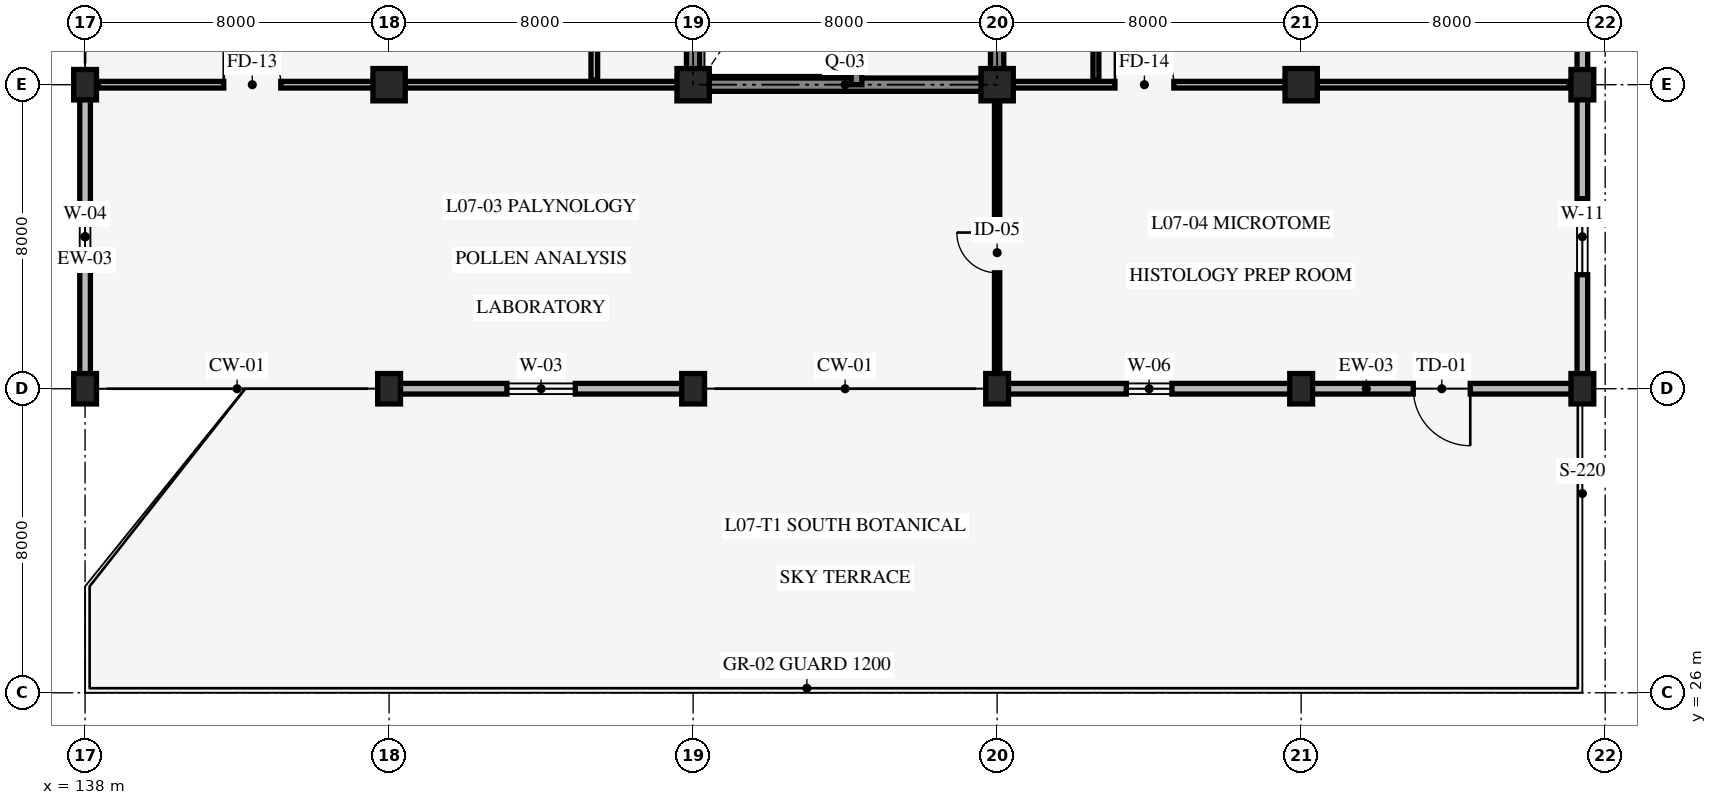
"""IFC4 building model, lengths in metres.
Left out: names, types, materials, properties, quantities, classifications, styles, units other than length and angle.
Written with IfcOpenShell. Run it as: python <this file> out.ifc"""

import sys

from ifc_helpers import new_model, si_unit, direction, frame, frame_2d, origin, origin_2d, place, context, subcontext, project, spatial, rectangle, extrude, element, fill, save


model = new_model("IFC4")
c1 = context("Model", 3, precision=1e-05, world=origin(), true_north=direction((0.0, 1.0)))
c2 = subcontext(c1, "Body", "Model", "MODEL_VIEW")
j1 = project(units=[si_unit("LENGTHUNIT", "METRE"), si_unit("PLANEANGLEUNIT", "RADIAN")], contexts=[c1])
p1 = place(None, origin())
s1 = spatial("IfcSite", under=j1, at=p1, CompositionType="ELEMENT")
p2 = place(p1, origin())
s2 = spatial("IfcBuilding", under=s1, at=p2, CompositionType="ELEMENT")
p3 = place(p2, frame((0.0, 0.0, 27.6)))
s3 = spatial("IfcBuildingStorey", under=s2, at=p3, CompositionType="ELEMENT", Elevation=27.6)
p4 = place(p3, frame((154.0, 42.0, 0.0), z_axis=(0.0, 0.0, 1.0), x_axis=(1.0, 0.0, 0.0)))
e1 = element("IfcWall", 1, at=p4, inside=s3, PredefinedType="SHEAR", context=c2, shape_type="SweptSolid", body=[
    extrude(rectangle(XDim=8.0, YDim=0.35, at=frame_2d((4.0, 0.0))), origin(), (0.0, 0.0, 1.0), 3.95),
])
p5 = place(p3, frame((162.0, 42.0, 0.0), z_axis=(0.0, 0.0, 1.0), x_axis=(0.0, 1.0, 0.0)))
e2 = element("IfcWall", 2, at=p5, inside=s3, PredefinedType="SHEAR", context=c2, shape_type="SweptSolid", body=[
    extrude(rectangle(XDim=8.0, YDim=0.35, at=frame_2d((4.0, 0.0))), origin(), (0.0, 0.0, 1.0), 3.95),
])
p6 = place(p5, frame((3.175, 0.0, 0.0)))
e3 = element("IfcOpeningElement", 3, at=p6, cuts=e2, PredefinedType="OPENING", context=c2, shape_type="SweptSolid", body=[
    extrude(rectangle(XDim=1.05, YDim=2.2, at=frame_2d((0.525, 1.1))), frame((0.0, 0.185, 0.0), z_axis=(0.0, -1.0, 0.0), x_axis=(1.0, 0.0, 0.0)), (0.0, 0.0, 1.0), 0.37),
])
p7 = place(p3, frame((154.0, 50.0, 0.0), z_axis=(0.0, 0.0, 1.0), x_axis=(0.0, -1.0, 0.0)))
e4 = element("IfcWall", 4, at=p7, inside=s3, PredefinedType="SHEAR", context=c2, shape_type="SweptSolid", body=[
    extrude(rectangle(XDim=8.0, YDim=0.35, at=frame_2d((4.0, 0.0))), origin(), (0.0, 0.0, 1.0), 3.95),
])
p8 = place(p3, frame((158.3, 42.0, 0.0), z_axis=(0.0, 0.0, 1.0), x_axis=(0.0, 1.0, 0.0)))
e5 = element("IfcWall", 5, at=p8, inside=s3, PredefinedType="SHEAR", context=c2, shape_type="SweptSolid", body=[
    extrude(rectangle(XDim=8.0, YDim=0.28, at=frame_2d((4.0, 0.0))), origin(), (0.0, 0.0, 1.0), 3.95),
])
for number, where, z_axis, x_axis in (
    (6, (138.0, 34.0, 0.0), (0.0, 0.0, 1.0), (1.0, 0.0, 0.0)),
    (7, (138.0, 42.0, 0.0), (0.0, 0.0, 1.0), (1.0, 0.0, 0.0)),
    (8, (146.0, 34.0, 0.0), (0.0, 0.0, 1.0), (1.0, 0.0, 0.0)),
):
    element("IfcColumn", number, at=place(p3, frame(where, z_axis=z_axis, x_axis=x_axis)), inside=s3, PredefinedType="COLUMN", context=c2, shape_type="SweptSolid", body=[
        extrude(rectangle(XDim=0.6, YDim=0.8, at=origin_2d()), origin(), (0.0, 0.0, 1.0), 4.2),
    ])
p9 = place(p3, frame((146.0, 42.0, 0.0), z_axis=(0.0, 0.0, 1.0), x_axis=(1.0, 0.0, 0.0)))
e9 = element("IfcColumn", 9, at=p9, inside=s3, PredefinedType="COLUMN", context=c2, shape_type="SweptSolid", body=[
    extrude(rectangle(XDim=0.85, YDim=0.85, at=origin_2d()), origin(), (0.0, 0.0, 1.0), 4.2),
])
p10 = place(p3, frame((154.0, 34.0, 0.0), z_axis=(0.0, 0.0, 1.0), x_axis=(1.0, 0.0, 0.0)))
e10 = element("IfcColumn", 10, at=p10, inside=s3, PredefinedType="COLUMN", context=c2, shape_type="SweptSolid", body=[
    extrude(rectangle(XDim=0.6, YDim=0.8, at=origin_2d()), origin(), (0.0, 0.0, 1.0), 4.2),
])
p11 = place(p3, frame((154.0, 42.0, 0.0), z_axis=(0.0, 0.0, 1.0), x_axis=(1.0, 0.0, 0.0)))
e11 = element("IfcColumn", 11, at=p11, inside=s3, PredefinedType="COLUMN", context=c2, shape_type="SweptSolid", body=[
    extrude(rectangle(XDim=0.85, YDim=0.85, at=origin_2d()), origin(), (0.0, 0.0, 1.0), 4.2),
])
p12 = place(p3, frame((162.0, 34.0, 0.0), z_axis=(0.0, 0.0, 1.0), x_axis=(1.0, 0.0, 0.0)))
e12 = element("IfcColumn", 12, at=p12, inside=s3, PredefinedType="COLUMN", context=c2, shape_type="SweptSolid", body=[
    extrude(rectangle(XDim=0.6, YDim=0.8, at=origin_2d()), origin(), (0.0, 0.0, 1.0), 4.2),
])
p13 = place(p3, frame((162.0, 42.0, 0.0), z_axis=(0.0, 0.0, 1.0), x_axis=(1.0, 0.0, 0.0)))
e13 = element("IfcColumn", 13, at=p13, inside=s3, PredefinedType="COLUMN", context=c2, shape_type="SweptSolid", body=[
    extrude(rectangle(XDim=0.85, YDim=0.85, at=origin_2d()), origin(), (0.0, 0.0, 1.0), 4.2),
])
p14 = place(p3, frame((170.0, 34.0, 0.0), z_axis=(0.0, 0.0, 1.0), x_axis=(1.0, 0.0, 0.0)))
e14 = element("IfcColumn", 14, at=p14, inside=s3, PredefinedType="COLUMN", context=c2, shape_type="SweptSolid", body=[
    extrude(rectangle(XDim=0.6, YDim=0.8, at=origin_2d()), origin(), (0.0, 0.0, 1.0), 4.2),
])
p15 = place(p3, frame((170.0, 42.0, 0.0), z_axis=(0.0, 0.0, 1.0), x_axis=(1.0, 0.0, 0.0)))
e15 = element("IfcColumn", 15, at=p15, inside=s3, PredefinedType="COLUMN", context=c2, shape_type="SweptSolid", body=[
    extrude(rectangle(XDim=0.85, YDim=0.85, at=origin_2d()), origin(), (0.0, 0.0, 1.0), 4.2),
])
for number, where, z_axis, x_axis in (
    (16, (177.4, 34.0, 0.0), (0.0, 0.0, 1.0), (1.0, 0.0, 0.0)),
    (17, (177.4, 42.0, 0.0), (0.0, 0.0, 1.0), (1.0, 0.0, 0.0)),
):
    element("IfcColumn", number, at=place(p3, frame(where, z_axis=z_axis, x_axis=x_axis)), inside=s3, PredefinedType="COLUMN", context=c2, shape_type="SweptSolid", body=[
        extrude(rectangle(XDim=0.6, YDim=0.8, at=origin_2d()), origin(), (0.0, 0.0, 1.0), 4.2),
    ])
p16 = place(p3, frame((177.4, 34.0, 0.0), z_axis=(0.0, 0.0, 1.0), x_axis=(-1.0, 0.0, 0.0)))
e18 = element("IfcWall", 18, at=p16, inside=s3, PredefinedType="STANDARD", context=c2, shape_type="SweptSolid", body=[
    extrude(rectangle(XDim=7.4, YDim=0.28, at=frame_2d((3.7, 0.0))), origin(), (0.0, 0.0, 1.0), 3.24),
])
p17 = place(p16, frame((2.95, 0.0, 0.0)))
e19 = element("IfcOpeningElement", 19, at=p17, cuts=e18, PredefinedType="OPENING", context=c2, shape_type="SweptSolid", body=[
    extrude(rectangle(XDim=1.5, YDim=2.25, at=frame_2d((0.75, 1.125))), frame((0.0, 0.15, 0.0), z_axis=(0.0, -1.0, 0.0), x_axis=(1.0, 0.0, 0.0)), (0.0, 0.0, 1.0), 0.3),
])
p18 = place(p3, frame((170.0, 34.0, 0.0), z_axis=(0.0, 0.0, 1.0), x_axis=(-1.0, 0.0, 0.0)))
e20 = element("IfcWall", 20, at=p18, inside=s3, PredefinedType="STANDARD", context=c2, shape_type="SweptSolid", body=[
    extrude(rectangle(XDim=8.0, YDim=0.28, at=frame_2d((4.0, 0.0))), origin(), (0.0, 0.0, 1.0), 3.24),
])
p19 = place(p18, frame((3.4, 0.0, 0.85)))
e21 = element("IfcOpeningElement", 21, at=p19, cuts=e20, PredefinedType="OPENING", context=c2, shape_type="SweptSolid", body=[
    extrude(rectangle(XDim=1.2, YDim=1.2, at=frame_2d((0.6, 0.6))), frame((0.0, 0.15, 0.0), z_axis=(0.0, -1.0, 0.0), x_axis=(1.0, 0.0, 0.0)), (0.0, 0.0, 1.0), 0.3),
])
p20 = place(p3, frame((154.0, 34.0, 0.0), z_axis=(0.0, 0.0, 1.0), x_axis=(-1.0, 0.0, 0.0)))
e22 = element("IfcWall", 22, at=p20, inside=s3, PredefinedType="STANDARD", context=c2, shape_type="SweptSolid", body=[
    extrude(rectangle(XDim=8.0, YDim=0.28, at=frame_2d((4.0, 0.0))), origin(), (0.0, 0.0, 1.0), 3.24),
])
p21 = place(p20, frame((3.1, 0.0, 0.85)))
e23 = element("IfcOpeningElement", 23, at=p21, cuts=e22, PredefinedType="OPENING", context=c2, shape_type="SweptSolid", body=[
    extrude(rectangle(XDim=1.8, YDim=1.4, at=frame_2d((0.9, 0.7))), frame((0.0, 0.15, 0.0), z_axis=(0.0, -1.0, 0.0), x_axis=(1.0, 0.0, 0.0)), (0.0, 0.0, 1.0), 0.3),
])
p22 = place(p3, frame((138.0, 34.0, 0.0), z_axis=(0.0, 0.0, 1.0), x_axis=(0.0, 1.0, 0.0)))
e24 = element("IfcWall", 24, at=p22, inside=s3, PredefinedType="STANDARD", context=c2, shape_type="SweptSolid", body=[
    extrude(rectangle(XDim=8.0, YDim=0.28, at=frame_2d((4.0, 0.0))), origin(), (0.0, 0.0, 1.0), 3.29),
])
p23 = place(p22, frame((3.2, 0.0, 0.85)))
e25 = element("IfcOpeningElement", 25, at=p23, cuts=e24, PredefinedType="OPENING", context=c2, shape_type="SweptSolid", body=[
    extrude(rectangle(XDim=1.6, YDim=1.2, at=frame_2d((0.8, 0.6))), frame((0.0, 0.15, 0.0), z_axis=(0.0, -1.0, 0.0), x_axis=(1.0, 0.0, 0.0)), (0.0, 0.0, 1.0), 0.3),
])
p24 = place(p3, frame((177.4, 50.0, 0.0), z_axis=(0.0, 0.0, 1.0), x_axis=(0.0, -1.0, 0.0)))
e26 = element("IfcWall", 26, at=p24, inside=s3, PredefinedType="STANDARD", context=c2, shape_type="SweptSolid", body=[
    extrude(rectangle(XDim=8.0, YDim=0.28, at=frame_2d((4.0, 0.0))), origin(), (0.0, 0.0, 1.0), 3.29),
])
p25 = place(p3, frame((177.4, 42.0, 0.0), z_axis=(0.0, 0.0, 1.0), x_axis=(0.0, -1.0, 0.0)))
e27 = element("IfcWall", 27, at=p25, inside=s3, PredefinedType="STANDARD", context=c2, shape_type="SweptSolid", body=[
    extrude(rectangle(XDim=8.0, YDim=0.28, at=frame_2d((4.0, 0.0))), origin(), (0.0, 0.0, 1.0), 3.29),
])
p26 = place(p25, frame((3.0, 0.0, 0.85)))
e28 = element("IfcOpeningElement", 28, at=p26, cuts=e27, PredefinedType="OPENING", context=c2, shape_type="SweptSolid", body=[
    extrude(rectangle(XDim=2.0, YDim=1.5, at=frame_2d((1.0, 0.75))), frame((0.0, 0.15, 0.0), z_axis=(0.0, -1.0, 0.0), x_axis=(1.0, 0.0, 0.0)), (0.0, 0.0, 1.0), 0.3),
])
p27 = place(p3, frame((151.4, 42.12, 0.0), z_axis=(0.0, 0.0, 1.0), x_axis=(0.0, 1.0, 0.0)))
e29 = element("IfcWall", 29, at=p27, inside=s3, PredefinedType="STANDARD", context=c2, shape_type="SweptSolid", body=[
    extrude(rectangle(XDim=11.76, YDim=0.175, at=frame_2d((5.88, 0.0))), origin(), (0.0, 0.0, 1.0), 3.9),
])
p28 = place(p27, frame((5.23, 0.0, 0.0)))
e30 = element("IfcOpeningElement", 30, at=p28, cuts=e29, PredefinedType="OPENING", context=c2, shape_type="SweptSolid", body=[
    extrude(rectangle(XDim=1.3, YDim=2.15, at=frame_2d((0.65, 1.075))), frame((0.0, 0.098, 0.0), z_axis=(0.0, -1.0, 0.0), x_axis=(1.0, 0.0, 0.0)), (0.0, 0.0, 1.0), 0.195),
])
p29 = place(p3, frame((164.6, 42.12, 0.0), z_axis=(0.0, 0.0, 1.0), x_axis=(0.0, 1.0, 0.0)))
e31 = element("IfcWall", 31, at=p29, inside=s3, PredefinedType="STANDARD", context=c2, shape_type="SweptSolid", body=[
    extrude(rectangle(XDim=7.8, YDim=0.155, at=frame_2d((3.9, 0.0))), origin(), (0.0, 0.0, 1.0), 3.9),
])
p30 = place(p29, frame((3.05, 0.0, 0.0)))
e32 = element("IfcOpeningElement", 32, at=p30, cuts=e31, PredefinedType="OPENING", context=c2, shape_type="SweptSolid", body=[
    extrude(rectangle(XDim=1.7, YDim=2.3, at=frame_2d((0.85, 1.15))), frame((0.0, 0.087, 0.0), z_axis=(0.0, -1.0, 0.0), x_axis=(1.0, 0.0, 0.0)), (0.0, 0.0, 1.0), 0.175),
])
p31 = place(p3, frame((138.35, 42.0, 0.0), z_axis=(0.0, 0.0, 1.0), x_axis=(1.0, 0.0, 0.0)))
e33 = element("IfcWall", 33, at=p31, inside=s3, PredefinedType="STANDARD", context=c2, shape_type="SweptSolid", body=[
    extrude(rectangle(XDim=15.3, YDim=0.175, at=frame_2d((7.65, 0.0))), origin(), (0.0, 0.0, 1.0), 3.24),
])
p32 = place(p31, frame((3.3, 0.0, 0.0)))
e34 = element("IfcOpeningElement", 34, at=p32, cuts=e33, PredefinedType="OPENING", context=c2, shape_type="SweptSolid", body=[
    extrude(rectangle(XDim=1.5, YDim=2.2, at=frame_2d((0.75, 1.1))), frame((0.0, 0.098, 0.0), z_axis=(0.0, -1.0, 0.0), x_axis=(1.0, 0.0, 0.0)), (0.0, 0.0, 1.0), 0.195),
])
p33 = place(p3, frame((162.0, 34.05, 0.0), z_axis=(0.0, 0.0, 1.0), x_axis=(0.0, 1.0, 0.0)))
e35 = element("IfcWall", 35, at=p33, inside=s3, PredefinedType="STANDARD", context=c2, shape_type="SweptSolid", body=[
    extrude(rectangle(XDim=7.83, YDim=0.14, at=frame_2d((3.915, 0.0))), origin(), (0.0, 0.0, 1.0), 3.29),
])
p34 = place(p33, frame((3.0, 0.0, 0.0)))
e36 = element("IfcOpeningElement", 36, at=p34, cuts=e35, PredefinedType="OPENING", context=c2, shape_type="SweptSolid", body=[
    extrude(rectangle(XDim=1.06, YDim=2.12, at=frame_2d((0.53, 1.06))), frame((0.0, 0.08, 0.0), z_axis=(0.0, -1.0, 0.0), x_axis=(1.0, 0.0, 0.0)), (0.0, 0.0, 1.0), 0.16),
])
p35 = place(p3, frame((162.35, 42.0, 0.0), z_axis=(0.0, 0.0, 1.0), x_axis=(1.0, 0.0, 0.0)))
e37 = element("IfcWall", 37, at=p35, inside=s3, PredefinedType="STANDARD", context=c2, shape_type="SweptSolid", body=[
    extrude(rectangle(XDim=14.7, YDim=0.175, at=frame_2d((7.35, 0.0))), origin(), (0.0, 0.0, 1.0), 3.24),
])
p36 = place(p35, frame((2.75, 0.0, 0.0)))
e38 = element("IfcOpeningElement", 38, at=p36, cuts=e37, PredefinedType="OPENING", context=c2, shape_type="SweptSolid", body=[
    extrude(rectangle(XDim=1.55, YDim=2.25, at=frame_2d((0.775, 1.125))), frame((0.0, 0.098, 0.0), z_axis=(0.0, -1.0, 0.0), x_axis=(1.0, 0.0, 0.0)), (0.0, 0.0, 1.0), 0.195),
])
p37 = place(p17, origin())
e39 = element("IfcDoor", 39, at=p37, inside=s3, OperationType="SINGLE_SWING_LEFT", PredefinedType="DOOR", context=c2, shape_type="SweptSolid", body=[
    extrude(rectangle(XDim=1.5, YDim=2.25, at=frame_2d((0.75, 1.125))), frame((0.0, 0.025, 0.0), z_axis=(0.0, -1.0, 0.0), x_axis=(1.0, 0.0, 0.0)), (0.0, 0.0, 1.0), 0.05),
])
fill(e19, e39)
p38 = place(p19, origin())
e40 = element("IfcWindow", 40, at=p38, inside=s3, PartitioningType="SINGLE_PANEL", PredefinedType="WINDOW", context=c2, shape_type="SweptSolid", body=[
    extrude(rectangle(XDim=1.2, YDim=1.2, at=frame_2d((0.6, 0.6))), frame((0.0, 0.03, 0.0), z_axis=(0.0, -1.0, 0.0), x_axis=(1.0, 0.0, 0.0)), (0.0, 0.0, 1.0), 0.06),
])
fill(e21, e40)
p39 = place(p21, origin())
e41 = element("IfcWindow", 41, at=p39, inside=s3, PartitioningType="SINGLE_PANEL", PredefinedType="WINDOW", context=c2, shape_type="SweptSolid", body=[
    extrude(rectangle(XDim=1.8, YDim=1.4, at=frame_2d((0.9, 0.7))), frame((0.0, 0.03, 0.0), z_axis=(0.0, -1.0, 0.0), x_axis=(1.0, 0.0, 0.0)), (0.0, 0.0, 1.0), 0.06),
])
fill(e23, e41)
p40 = place(p23, origin())
e42 = element("IfcWindow", 42, at=p40, inside=s3, PartitioningType="SINGLE_PANEL", PredefinedType="WINDOW", context=c2, shape_type="SweptSolid", body=[
    extrude(rectangle(XDim=1.6, YDim=1.2, at=frame_2d((0.8, 0.6))), frame((0.0, 0.03, 0.0), z_axis=(0.0, -1.0, 0.0), x_axis=(1.0, 0.0, 0.0)), (0.0, 0.0, 1.0), 0.06),
])
fill(e25, e42)
p41 = place(p26, origin())
e43 = element("IfcWindow", 43, at=p41, inside=s3, PartitioningType="SINGLE_PANEL", PredefinedType="WINDOW", context=c2, shape_type="SweptSolid", body=[
    extrude(rectangle(XDim=2.0, YDim=1.5, at=frame_2d((1.0, 0.75))), frame((0.0, 0.03, 0.0), z_axis=(0.0, -1.0, 0.0), x_axis=(1.0, 0.0, 0.0)), (0.0, 0.0, 1.0), 0.06),
])
fill(e28, e43)
p42 = place(p32, origin())
e44 = element("IfcDoor", 44, at=p42, inside=s3, OperationType="SINGLE_SWING_LEFT", PredefinedType="DOOR", context=c2, shape_type="SweptSolid", body=[
    extrude(rectangle(XDim=1.5, YDim=2.2, at=frame_2d((0.75, 1.1))), frame((0.0, 0.025, 0.0), z_axis=(0.0, -1.0, 0.0), x_axis=(1.0, 0.0, 0.0)), (0.0, 0.0, 1.0), 0.05),
])
fill(e34, e44)
p43 = place(p34, origin())
e45 = element("IfcDoor", 45, at=p43, inside=s3, OperationType="SINGLE_SWING_RIGHT", PredefinedType="DOOR", context=c2, shape_type="SweptSolid", body=[
    extrude(rectangle(XDim=1.06, YDim=2.12, at=frame_2d((0.53, 1.06))), frame((0.0, 0.025, 0.0), z_axis=(0.0, -1.0, 0.0), x_axis=(1.0, 0.0, 0.0)), (0.0, 0.0, 1.0), 0.05),
])
fill(e36, e45)
p44 = place(p36, origin())
e46 = element("IfcDoor", 46, at=p44, inside=s3, OperationType="SINGLE_SWING_LEFT", PredefinedType="DOOR", context=c2, shape_type="SweptSolid", body=[
    extrude(rectangle(XDim=1.55, YDim=2.25, at=frame_2d((0.775, 1.125))), frame((0.0, 0.025, 0.0), z_axis=(0.0, -1.0, 0.0), x_axis=(1.0, 0.0, 0.0)), (0.0, 0.0, 1.0), 0.05),
])
fill(e38, e46)
save(model, sys.argv[1])
